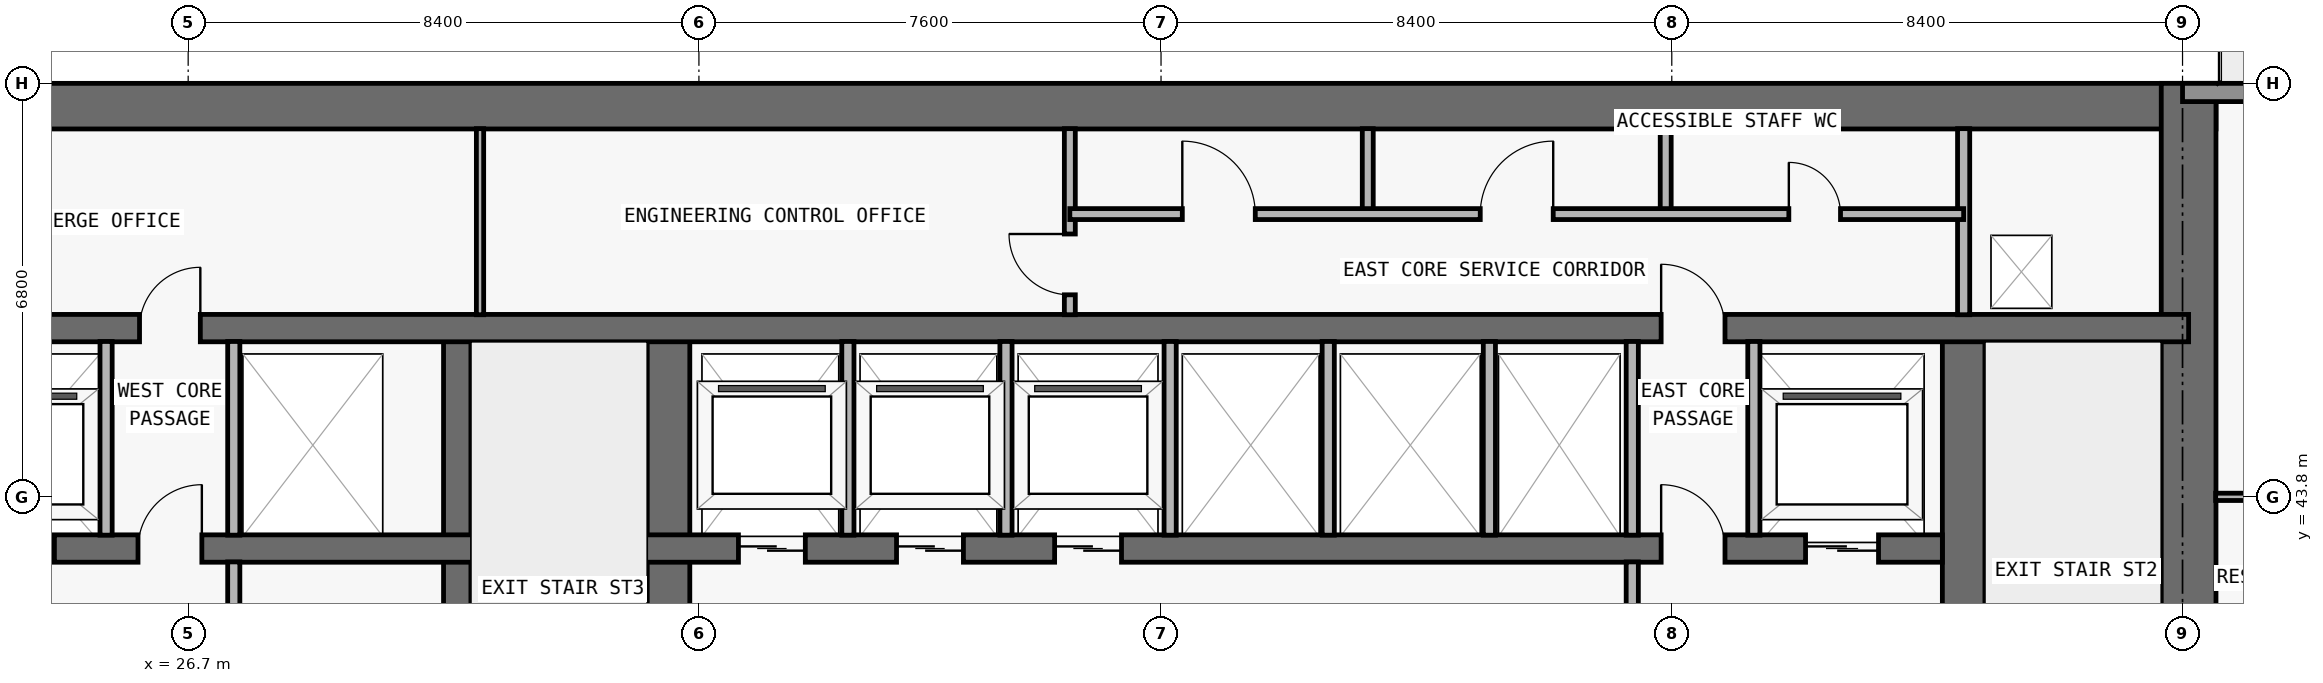
"""IFC4 building model, lengths in metres.
Left out: names, types, materials, properties, quantities, classifications, styles, units other than length and angle.
Written with IfcOpenShell. Run it as: python <this file> out.ifc"""

import sys

from ifc_helpers import new_model, si_unit, direction, frame, frame_2d, origin, place, context, subcontext, project, spatial, rectangle, extrude, element, fill, save


model = new_model("IFC4")
c1 = context("Model", 3, precision=1e-05, world=origin(), true_north=direction((0.0, 1.0)))
c2 = subcontext(c1, "Body", "Model", "MODEL_VIEW")
j1 = project(units=[si_unit("LENGTHUNIT", "METRE"), si_unit("PLANEANGLEUNIT", "RADIAN")], contexts=[c1])
p1 = place(None, origin())
s1 = spatial("IfcSite", under=j1, at=p1, CompositionType="ELEMENT")
p2 = place(p1, origin())
s2 = spatial("IfcBuilding", under=s1, at=p2, CompositionType="ELEMENT")
p3 = place(p2, frame((0.0, 0.0, 56.4)))
s3 = spatial("IfcBuildingStorey", under=s2, at=p3, CompositionType="ELEMENT", Elevation=56.4)
p4 = place(p3, frame((17.75, 50.225, 0.0), z_axis=(0.0, 0.0, 1.0), x_axis=(1.0, 0.0, 0.0)))
e1 = element("IfcWall", 1, at=p4, inside=s3, PredefinedType="SHEAR", context=c2, shape_type="SweptSolid", body=[
    extrude(rectangle(XDim=42.3, YDim=0.75, at=frame_2d((21.15, 0.0))), origin(), (0.0, 0.0, 1.0), 3.05),
])
p5 = place(p3, frame((59.6, 36.45, 0.0), z_axis=(0.0, 0.0, 1.0), x_axis=(0.0, 1.0, 0.0)))
e2 = element("IfcWall", 2, at=p5, inside=s3, PredefinedType="SHEAR", context=c2, shape_type="SweptSolid", body=[
    extrude(rectangle(XDim=14.15, YDim=0.9, at=frame_2d((7.075, 0.0))), origin(), (0.0, 0.0, 1.0), 3.05),
])
p6 = place(p3, frame((55.9, 36.9, 0.0), z_axis=(0.0, 0.0, 1.0), x_axis=(0.0, 1.0, 0.0)))
e3 = element("IfcWall", 3, at=p6, inside=s3, PredefinedType="SHEAR", context=c2, shape_type="SweptSolid", body=[
    extrude(rectangle(XDim=9.675, YDim=0.7, at=frame_2d((4.837, 0.0))), origin(), (0.0, 0.0, 1.0), 3.05),
])
p7 = place(p6, frame((0.65, 0.0, 0.0)))
e4 = element("IfcOpeningElement", 4, at=p7, cuts=e3, PredefinedType="OPENING", context=c2, shape_type="SweptSolid", body=[
    extrude(rectangle(XDim=1.1, YDim=2.15, at=frame_2d((0.55, 1.075))), frame((0.0, 0.36, 0.0), z_axis=(0.0, -1.0, 0.0), x_axis=(1.0, 0.0, 0.0)), (0.0, 0.0, 1.0), 0.72),
])
p8 = place(p3, frame((31.125, 36.9, 0.0), z_axis=(0.0, 0.0, 1.0), x_axis=(0.0, 1.0, 0.0)))
e5 = element("IfcWall", 5, at=p8, inside=s3, PredefinedType="SHEAR", context=c2, shape_type="SweptSolid", body=[
    extrude(rectangle(XDim=9.675, YDim=0.45, at=frame_2d((4.837, 0.0))), origin(), (0.0, 0.0, 1.0), 3.05),
])
p9 = place(p3, frame((34.6, 36.9, 0.0), z_axis=(0.0, 0.0, 1.0), x_axis=(0.0, 1.0, 0.0)))
e6 = element("IfcWall", 6, at=p9, inside=s3, PredefinedType="SHEAR", context=c2, shape_type="SweptSolid", body=[
    extrude(rectangle(XDim=9.675, YDim=0.7, at=frame_2d((4.837, 0.0))), origin(), (0.0, 0.0, 1.0), 3.05),
])
p10 = place(p3, frame((22.25, 42.95, 0.0), z_axis=(0.0, 0.0, 1.0), x_axis=(1.0, 0.0, 0.0)))
e7 = element("IfcWall", 7, at=p10, inside=s3, PredefinedType="SHEAR", context=c2, shape_type="SweptSolid", body=[
    extrude(rectangle(XDim=33.3, YDim=0.45, at=frame_2d((16.65, 0.0))), origin(), (0.0, 0.0, 1.0), 3.05),
])
p11 = place(p10, frame((1.05, 0.0, 0.0)))
e8 = element("IfcOpeningElement", 8, at=p11, cuts=e7, PredefinedType="OPENING", context=c2, shape_type="SweptSolid", body=[
    extrude(rectangle(XDim=1.2, YDim=2.2, at=frame_2d((0.6, 1.1))), frame((0.0, 0.235, 0.0), z_axis=(0.0, -1.0, 0.0), x_axis=(1.0, 0.0, 0.0)), (0.0, 0.0, 1.0), 0.47),
])
p12 = place(p10, frame((31.05, 0.0, 0.0)))
e9 = element("IfcOpeningElement", 9, at=p12, cuts=e7, PredefinedType="OPENING", context=c2, shape_type="SweptSolid", body=[
    extrude(rectangle(XDim=1.2, YDim=2.2, at=frame_2d((0.6, 1.1))), frame((0.0, 0.235, 0.0), z_axis=(0.0, -1.0, 0.0), x_axis=(1.0, 0.0, 0.0)), (0.0, 0.0, 1.0), 0.47),
])
p13 = place(p10, frame((13.5, 0.0, 0.0)))
e10 = element("IfcOpeningElement", 10, at=p13, cuts=e7, PredefinedType="OPENING", context=c2, shape_type="SweptSolid", body=[
    extrude(rectangle(XDim=1.1, YDim=2.2, at=frame_2d((0.55, 1.1))), frame((0.0, 0.235, 0.0), z_axis=(0.0, -1.0, 0.0), x_axis=(1.0, 0.0, 0.0)), (0.0, 0.0, 1.0), 0.47),
])
p14 = place(p10, frame((16.1, 0.0, 0.0)))
e11 = element("IfcOpeningElement", 11, at=p14, cuts=e7, PredefinedType="OPENING", context=c2, shape_type="SweptSolid", body=[
    extrude(rectangle(XDim=1.1, YDim=2.2, at=frame_2d((0.55, 1.1))), frame((0.0, 0.235, 0.0), z_axis=(0.0, -1.0, 0.0), x_axis=(1.0, 0.0, 0.0)), (0.0, 0.0, 1.0), 0.47),
])
p15 = place(p10, frame((18.7, 0.0, 0.0)))
e12 = element("IfcOpeningElement", 12, at=p15, cuts=e7, PredefinedType="OPENING", context=c2, shape_type="SweptSolid", body=[
    extrude(rectangle(XDim=1.1, YDim=2.2, at=frame_2d((0.55, 1.1))), frame((0.0, 0.235, 0.0), z_axis=(0.0, -1.0, 0.0), x_axis=(1.0, 0.0, 0.0)), (0.0, 0.0, 1.0), 0.47),
])
p16 = place(p10, frame((3.625, 0.0, 0.0)))
e13 = element("IfcOpeningElement", 13, at=p16, cuts=e7, PredefinedType="OPENING", context=c2, shape_type="SweptSolid", body=[
    extrude(rectangle(XDim=1.05, YDim=2.15, at=frame_2d((0.525, 1.075))), frame((0.0, 0.235, 0.0), z_axis=(0.0, -1.0, 0.0), x_axis=(1.0, 0.0, 0.0)), (0.0, 0.0, 1.0), 0.47),
])
p17 = place(p10, frame((28.675, 0.0, 0.0)))
e14 = element("IfcOpeningElement", 14, at=p17, cuts=e7, PredefinedType="OPENING", context=c2, shape_type="SweptSolid", body=[
    extrude(rectangle(XDim=1.05, YDim=2.15, at=frame_2d((0.525, 1.075))), frame((0.0, 0.235, 0.0), z_axis=(0.0, -1.0, 0.0), x_axis=(1.0, 0.0, 0.0)), (0.0, 0.0, 1.0), 0.47),
])
p18 = place(p3, frame((18.2, 46.575, 0.0), z_axis=(0.0, 0.0, 1.0), x_axis=(1.0, 0.0, 0.0)))
e15 = element("IfcWall", 15, at=p18, inside=s3, PredefinedType="SHEAR", context=c2, shape_type="SweptSolid", body=[
    extrude(rectangle(XDim=41.4, YDim=0.45, at=frame_2d((20.7, 0.0))), origin(), (0.0, 0.0, 1.0), 3.05),
])
p19 = place(p18, frame((7.7, 0.0, 0.0)))
e16 = element("IfcOpeningElement", 16, at=p19, cuts=e15, PredefinedType="OPENING", context=c2, shape_type="SweptSolid", body=[
    extrude(rectangle(XDim=1.0, YDim=2.2, at=frame_2d((0.5, 1.1))), frame((0.0, 0.235, 0.0), z_axis=(0.0, -1.0, 0.0), x_axis=(1.0, 0.0, 0.0)), (0.0, 0.0, 1.0), 0.47),
])
p20 = place(p18, frame((32.725, 0.0, 0.0)))
e17 = element("IfcOpeningElement", 17, at=p20, cuts=e15, PredefinedType="OPENING", context=c2, shape_type="SweptSolid", body=[
    extrude(rectangle(XDim=1.05, YDim=2.15, at=frame_2d((0.525, 1.075))), frame((0.0, 0.235, 0.0), z_axis=(0.0, -1.0, 0.0), x_axis=(1.0, 0.0, 0.0)), (0.0, 0.0, 1.0), 0.47),
])
p21 = place(p3, frame((59.5, 50.45, 0.0), z_axis=(0.0, 0.0, 1.0), x_axis=(1.0, 0.0, 0.0)))
e18 = element("IfcWall", 18, at=p21, inside=s3, PredefinedType="STANDARD", context=c2, shape_type="SweptSolid", body=[
    extrude(rectangle(XDim=13.2, YDim=0.3, at=frame_2d((6.6, 0.0))), origin(), (0.0, 0.0, 1.0), 3.05),
])
p22 = place(p21, frame((5.6, 0.0, 0.0)))
e19 = element("IfcOpeningElement", 19, at=p22, cuts=e18, PredefinedType="OPENING", context=c2, shape_type="SweptSolid", body=[
    extrude(rectangle(XDim=2.0, YDim=2.3, at=frame_2d((1.0, 1.15))), frame((0.0, 0.16, 0.0), z_axis=(0.0, -1.0, 0.0), x_axis=(1.0, 0.0, 0.0)), (0.0, 0.0, 1.0), 0.32),
])
p23 = place(p3, frame((25.35, 43.17, 0.0), z_axis=(0.0, 0.0, 1.0), x_axis=(0.0, 1.0, 0.0)))
e20 = element("IfcWall", 20, at=p23, inside=s3, PredefinedType="PARTITIONING", context=c2, shape_type="SweptSolid", body=[
    extrude(rectangle(XDim=3.185, YDim=0.2, at=frame_2d((1.593, 0.0))), origin(), (0.0, 0.0, 1.0), 3.05),
])
p24 = place(p3, frame((27.45, 37.345, 0.0), z_axis=(0.0, 0.0, 1.0), x_axis=(0.0, 1.0, 0.0)))
e21 = element("IfcWall", 21, at=p24, inside=s3, PredefinedType="PARTITIONING", context=c2, shape_type="SweptSolid", body=[
    extrude(rectangle(XDim=5.385, YDim=0.2, at=frame_2d((2.692, 0.0))), origin(), (0.0, 0.0, 1.0), 3.05),
])
p25 = place(p3, frame((27.45, 43.17, 0.0), z_axis=(0.0, 0.0, 1.0), x_axis=(0.0, 1.0, 0.0)))
e22 = element("IfcWall", 22, at=p25, inside=s3, PredefinedType="PARTITIONING", context=c2, shape_type="SweptSolid", body=[
    extrude(rectangle(XDim=3.185, YDim=0.2, at=frame_2d((1.593, 0.0))), origin(), (0.0, 0.0, 1.0), 3.05),
])
p26 = place(p3, frame((31.5, 46.795, 0.0), z_axis=(0.0, 0.0, 1.0), x_axis=(0.0, 1.0, 0.0)))
e23 = element("IfcWall", 23, at=p26, inside=s3, PredefinedType="PARTITIONING", context=c2, shape_type="SweptSolid", body=[
    extrude(rectangle(XDim=3.06, YDim=0.12, at=frame_2d((1.53, 0.0))), origin(), (0.0, 0.0, 1.0), 3.05),
])
for number, where, z_axis, x_axis in (
    (24, (37.55, 43.17, 0.0), (0.0, 0.0, 1.0), (0.0, 1.0, 0.0)),
    (25, (40.15, 43.17, 0.0), (0.0, 0.0, 1.0), (0.0, 1.0, 0.0)),
):
    element("IfcWall", number, at=place(p3, frame(where, z_axis=z_axis, x_axis=x_axis)), inside=s3, PredefinedType="PARTITIONING", context=c2, shape_type="SweptSolid", body=[
        extrude(rectangle(XDim=3.185, YDim=0.2, at=frame_2d((1.593, 0.0))), origin(), (0.0, 0.0, 1.0), 3.05),
    ])
p27 = place(p3, frame((41.2, 46.795, 0.0), z_axis=(0.0, 0.0, 1.0), x_axis=(0.0, 1.0, 0.0)))
e26 = element("IfcWall", 26, at=p27, inside=s3, PredefinedType="PARTITIONING", context=c2, shape_type="SweptSolid", body=[
    extrude(rectangle(XDim=3.06, YDim=0.18, at=frame_2d((1.53, 0.0))), origin(), (0.0, 0.0, 1.0), 3.05),
])
p28 = place(p27, frame((0.327, 0.0, 0.0)))
e27 = element("IfcOpeningElement", 27, at=p28, cuts=e26, PredefinedType="OPENING", context=c2, shape_type="SweptSolid", body=[
    extrude(rectangle(XDim=1.0, YDim=2.2, at=frame_2d((0.5, 1.1))), frame((0.0, 0.1, 0.0), z_axis=(0.0, -1.0, 0.0), x_axis=(1.0, 0.0, 0.0)), (0.0, 0.0, 1.0), 0.2),
])
for number, where, z_axis, x_axis in (
    (28, (42.85, 43.17, 0.0), (0.0, 0.0, 1.0), (0.0, 1.0, 0.0)),
    (29, (45.45, 43.17, 0.0), (0.0, 0.0, 1.0), (0.0, 1.0, 0.0)),
):
    element("IfcWall", number, at=place(p3, frame(where, z_axis=z_axis, x_axis=x_axis)), inside=s3, PredefinedType="PARTITIONING", context=c2, shape_type="SweptSolid", body=[
        extrude(rectangle(XDim=3.185, YDim=0.2, at=frame_2d((1.593, 0.0))), origin(), (0.0, 0.0, 1.0), 3.05),
    ])
p29 = place(p3, frame((46.1, 48.45, 0.0), z_axis=(0.0, 0.0, 1.0), x_axis=(0.0, 1.0, 0.0)))
e30 = element("IfcWall", 30, at=p29, inside=s3, PredefinedType="PARTITIONING", context=c2, shape_type="SweptSolid", body=[
    extrude(rectangle(XDim=1.405, YDim=0.18, at=frame_2d((0.703, 0.0))), origin(), (0.0, 0.0, 1.0), 3.05),
])
p30 = place(p3, frame((48.1, 43.17, 0.0), z_axis=(0.0, 0.0, 1.0), x_axis=(0.0, 1.0, 0.0)))
e31 = element("IfcWall", 31, at=p30, inside=s3, PredefinedType="PARTITIONING", context=c2, shape_type="SweptSolid", body=[
    extrude(rectangle(XDim=3.185, YDim=0.2, at=frame_2d((1.593, 0.0))), origin(), (0.0, 0.0, 1.0), 3.05),
])
p31 = place(p3, frame((50.45, 37.345, 0.0), z_axis=(0.0, 0.0, 1.0), x_axis=(0.0, 1.0, 0.0)))
e32 = element("IfcWall", 32, at=p31, inside=s3, PredefinedType="PARTITIONING", context=c2, shape_type="SweptSolid", body=[
    extrude(rectangle(XDim=5.385, YDim=0.2, at=frame_2d((2.692, 0.0))), origin(), (0.0, 0.0, 1.0), 3.05),
])
p32 = place(p3, frame((50.45, 43.17, 0.0), z_axis=(0.0, 0.0, 1.0), x_axis=(0.0, 1.0, 0.0)))
e33 = element("IfcWall", 33, at=p32, inside=s3, PredefinedType="PARTITIONING", context=c2, shape_type="SweptSolid", body=[
    extrude(rectangle(XDim=3.185, YDim=0.2, at=frame_2d((1.593, 0.0))), origin(), (0.0, 0.0, 1.0), 3.05),
])
p33 = place(p3, frame((51.0, 48.45, 0.0), z_axis=(0.0, 0.0, 1.0), x_axis=(0.0, 1.0, 0.0)))
e34 = element("IfcWall", 34, at=p33, inside=s3, PredefinedType="PARTITIONING", context=c2, shape_type="SweptSolid", body=[
    extrude(rectangle(XDim=1.405, YDim=0.18, at=frame_2d((0.703, 0.0))), origin(), (0.0, 0.0, 1.0), 3.05),
])
p34 = place(p3, frame((52.45, 43.17, 0.0), z_axis=(0.0, 0.0, 1.0), x_axis=(0.0, 1.0, 0.0)))
e35 = element("IfcWall", 35, at=p34, inside=s3, PredefinedType="PARTITIONING", context=c2, shape_type="SweptSolid", body=[
    extrude(rectangle(XDim=3.185, YDim=0.2, at=frame_2d((1.593, 0.0))), origin(), (0.0, 0.0, 1.0), 3.05),
])
p35 = place(p3, frame((55.9, 46.795, 0.0), z_axis=(0.0, 0.0, 1.0), x_axis=(0.0, 1.0, 0.0)))
e36 = element("IfcWall", 36, at=p35, inside=s3, PredefinedType="PARTITIONING", context=c2, shape_type="SweptSolid", body=[
    extrude(rectangle(XDim=3.06, YDim=0.2, at=frame_2d((1.53, 0.0))), origin(), (0.0, 0.0, 1.0), 3.05),
])
p36 = place(p3, frame((60.045, 43.8, 0.0), z_axis=(0.0, 0.0, 1.0), x_axis=(1.0, 0.0, 0.0)))
e37 = element("IfcWall", 37, at=p36, inside=s3, PredefinedType="PARTITIONING", context=c2, shape_type="SweptSolid", body=[
    extrude(rectangle(XDim=15.96, YDim=0.12, at=frame_2d((7.98, 0.0))), origin(), (0.0, 0.0, 1.0), 2.339),
])
p37 = place(p36, frame((9.805, 0.0, 0.0)))
e38 = element("IfcOpeningElement", 38, at=p37, cuts=e37, PredefinedType="OPENING", context=c2, shape_type="SweptSolid", body=[
    extrude(rectangle(XDim=0.9, YDim=2.15, at=frame_2d((0.45, 1.075))), frame((0.0, 0.07, 0.0), z_axis=(0.0, -1.0, 0.0), x_axis=(1.0, 0.0, 0.0)), (0.0, 0.0, 1.0), 0.14),
])
p38 = place(p36, frame((4.58, 0.0, 0.0)))
e39 = element("IfcOpeningElement", 39, at=p38, cuts=e37, PredefinedType="OPENING", context=c2, shape_type="SweptSolid", body=[
    extrude(rectangle(XDim=0.9, YDim=2.15, at=frame_2d((0.45, 1.075))), frame((0.0, 0.07, 0.0), z_axis=(0.0, -1.0, 0.0), x_axis=(1.0, 0.0, 0.0)), (0.0, 0.0, 1.0), 0.14),
])
p39 = place(p36, frame((0.677, 0.0, 0.0)))
e40 = element("IfcOpeningElement", 40, at=p39, cuts=e37, PredefinedType="OPENING", context=c2, shape_type="SweptSolid", body=[
    extrude(rectangle(XDim=0.85, YDim=2.1, at=frame_2d((0.425, 1.05))), frame((0.0, 0.07, 0.0), z_axis=(0.0, -1.0, 0.0), x_axis=(1.0, 0.0, 0.0)), (0.0, 0.0, 1.0), 0.14),
])
p40 = place(p3, frame((41.2, 48.45, 0.0), z_axis=(0.0, 0.0, 1.0), x_axis=(1.0, 0.0, 0.0)))
e41 = element("IfcWall", 41, at=p40, inside=s3, PredefinedType="PARTITIONING", context=c2, shape_type="SweptSolid", body=[
    extrude(rectangle(XDim=14.7, YDim=0.18, at=frame_2d((7.35, 0.0))), origin(), (0.0, 0.0, 1.0), 3.05),
])
p41 = place(p40, frame((1.85, 0.0, 0.0)))
e42 = element("IfcOpeningElement", 42, at=p41, cuts=e41, PredefinedType="OPENING", context=c2, shape_type="SweptSolid", body=[
    extrude(rectangle(XDim=1.2, YDim=2.2, at=frame_2d((0.6, 1.1))), frame((0.0, 0.1, 0.0), z_axis=(0.0, -1.0, 0.0), x_axis=(1.0, 0.0, 0.0)), (0.0, 0.0, 1.0), 0.2),
])
p42 = place(p40, frame((6.75, 0.0, 0.0)))
e43 = element("IfcOpeningElement", 43, at=p42, cuts=e41, PredefinedType="OPENING", context=c2, shape_type="SweptSolid", body=[
    extrude(rectangle(XDim=1.2, YDim=2.2, at=frame_2d((0.6, 1.1))), frame((0.0, 0.1, 0.0), z_axis=(0.0, -1.0, 0.0), x_axis=(1.0, 0.0, 0.0)), (0.0, 0.0, 1.0), 0.2),
])
p43 = place(p40, frame((11.825, 0.0, 0.0)))
e44 = element("IfcOpeningElement", 44, at=p43, cuts=e41, PredefinedType="OPENING", context=c2, shape_type="SweptSolid", body=[
    extrude(rectangle(XDim=0.85, YDim=2.1, at=frame_2d((0.425, 1.05))), frame((0.0, 0.1, 0.0), z_axis=(0.0, -1.0, 0.0), x_axis=(1.0, 0.0, 0.0)), (0.0, 0.0, 1.0), 0.2),
])
p44 = place(p11, origin())
e45 = element("IfcDoor", 45, at=p44, inside=s3, OperationType="DOUBLE_DOOR_SLIDING", PredefinedType="DOOR", context=c2, shape_type="SweptSolid", body=[
    extrude(rectangle(XDim=1.2, YDim=2.2, at=frame_2d((0.6, 1.1))), frame((0.0, 0.025, 0.0), z_axis=(0.0, -1.0, 0.0), x_axis=(1.0, 0.0, 0.0)), (0.0, 0.0, 1.0), 0.05),
])
fill(e8, e45)
p45 = place(p12, origin())
e46 = element("IfcDoor", 46, at=p45, inside=s3, OperationType="DOUBLE_DOOR_SLIDING", PredefinedType="DOOR", context=c2, shape_type="SweptSolid", body=[
    extrude(rectangle(XDim=1.2, YDim=2.2, at=frame_2d((0.6, 1.1))), frame((0.0, 0.025, 0.0), z_axis=(0.0, -1.0, 0.0), x_axis=(1.0, 0.0, 0.0)), (0.0, 0.0, 1.0), 0.05),
])
fill(e9, e46)
p46 = place(p13, origin())
e47 = element("IfcDoor", 47, at=p46, inside=s3, OperationType="DOUBLE_DOOR_SLIDING", PredefinedType="DOOR", context=c2, shape_type="SweptSolid", body=[
    extrude(rectangle(XDim=1.1, YDim=2.2, at=frame_2d((0.55, 1.1))), frame((0.0, 0.025, 0.0), z_axis=(0.0, -1.0, 0.0), x_axis=(1.0, 0.0, 0.0)), (0.0, 0.0, 1.0), 0.05),
])
fill(e10, e47)
p47 = place(p14, origin())
e48 = element("IfcDoor", 48, at=p47, inside=s3, OperationType="DOUBLE_DOOR_SLIDING", PredefinedType="DOOR", context=c2, shape_type="SweptSolid", body=[
    extrude(rectangle(XDim=1.1, YDim=2.2, at=frame_2d((0.55, 1.1))), frame((0.0, 0.025, 0.0), z_axis=(0.0, -1.0, 0.0), x_axis=(1.0, 0.0, 0.0)), (0.0, 0.0, 1.0), 0.05),
])
fill(e11, e48)
p48 = place(p15, origin())
e49 = element("IfcDoor", 49, at=p48, inside=s3, OperationType="DOUBLE_DOOR_SLIDING", PredefinedType="DOOR", context=c2, shape_type="SweptSolid", body=[
    extrude(rectangle(XDim=1.1, YDim=2.2, at=frame_2d((0.55, 1.1))), frame((0.0, 0.025, 0.0), z_axis=(0.0, -1.0, 0.0), x_axis=(1.0, 0.0, 0.0)), (0.0, 0.0, 1.0), 0.05),
])
fill(e12, e49)
p49 = place(p16, origin())
e50 = element("IfcDoor", 50, at=p49, inside=s3, OperationType="SINGLE_SWING_RIGHT", PredefinedType="DOOR", context=c2, shape_type="SweptSolid", body=[
    extrude(rectangle(XDim=1.05, YDim=2.15, at=frame_2d((0.525, 1.075))), frame((0.0, 0.025, 0.0), z_axis=(0.0, -1.0, 0.0), x_axis=(1.0, 0.0, 0.0)), (0.0, 0.0, 1.0), 0.05),
])
fill(e13, e50)
p50 = place(p17, origin())
e51 = element("IfcDoor", 51, at=p50, inside=s3, OperationType="SINGLE_SWING_LEFT", PredefinedType="DOOR", context=c2, shape_type="SweptSolid", body=[
    extrude(rectangle(XDim=1.05, YDim=2.15, at=frame_2d((0.525, 1.075))), frame((0.0, 0.025, 0.0), z_axis=(0.0, -1.0, 0.0), x_axis=(1.0, 0.0, 0.0)), (0.0, 0.0, 1.0), 0.05),
])
fill(e14, e51)
p51 = place(p19, origin())
e52 = element("IfcDoor", 52, at=p51, inside=s3, OperationType="SINGLE_SWING_RIGHT", PredefinedType="DOOR", context=c2, shape_type="SweptSolid", body=[
    extrude(rectangle(XDim=1.0, YDim=2.2, at=frame_2d((0.5, 1.1))), frame((0.0, 0.025, 0.0), z_axis=(0.0, -1.0, 0.0), x_axis=(1.0, 0.0, 0.0)), (0.0, 0.0, 1.0), 0.05),
])
fill(e16, e52)
p52 = place(p20, origin())
e53 = element("IfcDoor", 53, at=p52, inside=s3, OperationType="SINGLE_SWING_LEFT", PredefinedType="DOOR", context=c2, shape_type="SweptSolid", body=[
    extrude(rectangle(XDim=1.05, YDim=2.15, at=frame_2d((0.525, 1.075))), frame((0.0, 0.025, 0.0), z_axis=(0.0, -1.0, 0.0), x_axis=(1.0, 0.0, 0.0)), (0.0, 0.0, 1.0), 0.05),
])
fill(e17, e53)
p53 = place(p28, origin())
e54 = element("IfcDoor", 54, at=p53, inside=s3, OperationType="SINGLE_SWING_RIGHT", PredefinedType="DOOR", context=c2, shape_type="SweptSolid", body=[
    extrude(rectangle(XDim=1.0, YDim=2.2, at=frame_2d((0.5, 1.1))), frame((0.0, 0.025, 0.0), z_axis=(0.0, -1.0, 0.0), x_axis=(1.0, 0.0, 0.0)), (0.0, 0.0, 1.0), 0.05),
])
fill(e27, e54)
p54 = place(p41, origin())
e55 = element("IfcDoor", 55, at=p54, inside=s3, OperationType="SINGLE_SWING_LEFT", PredefinedType="DOOR", context=c2, shape_type="SweptSolid", body=[
    extrude(rectangle(XDim=1.2, YDim=2.2, at=frame_2d((0.6, 1.1))), frame((0.0, 0.025, 0.0), z_axis=(0.0, -1.0, 0.0), x_axis=(1.0, 0.0, 0.0)), (0.0, 0.0, 1.0), 0.05),
])
fill(e42, e55)
p55 = place(p42, origin())
e56 = element("IfcDoor", 56, at=p55, inside=s3, OperationType="SINGLE_SWING_RIGHT", PredefinedType="DOOR", context=c2, shape_type="SweptSolid", body=[
    extrude(rectangle(XDim=1.2, YDim=2.2, at=frame_2d((0.6, 1.1))), frame((0.0, 0.025, 0.0), z_axis=(0.0, -1.0, 0.0), x_axis=(1.0, 0.0, 0.0)), (0.0, 0.0, 1.0), 0.05),
])
fill(e43, e56)
p56 = place(p43, origin())
e57 = element("IfcDoor", 57, at=p56, inside=s3, OperationType="SINGLE_SWING_LEFT", PredefinedType="DOOR", context=c2, shape_type="SweptSolid", body=[
    extrude(rectangle(XDim=0.85, YDim=2.1, at=frame_2d((0.425, 1.05))), frame((0.0, 0.025, 0.0), z_axis=(0.0, -1.0, 0.0), x_axis=(1.0, 0.0, 0.0)), (0.0, 0.0, 1.0), 0.05),
])
fill(e44, e57)
save(model, sys.argv[1])
